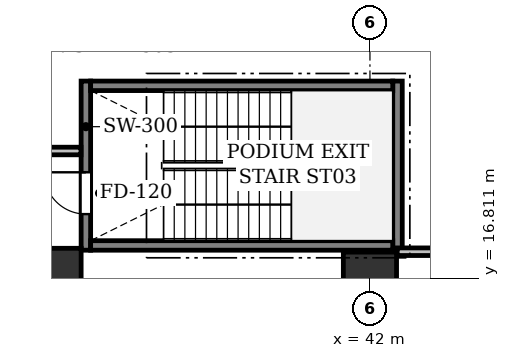
"""IFC4 building model, lengths in metres.
Left out: names, types, materials, properties, quantities, classifications, styles, units other than length and angle.
Written with IfcOpenShell. Run it as: python <this file> out.ifc"""

import sys

from ifc_helpers import new_model, si_unit, direction, frame, frame_2d, origin, origin_2d, place, context, subcontext, project, spatial, rectangle, extrude, element, fill, save


model = new_model("IFC4")
c1 = context("Model", 3, precision=1e-05, world=origin(), true_north=direction((0.0, 1.0)))
c2 = subcontext(c1, "Body", "Model", "MODEL_VIEW")
j1 = project(units=[si_unit("LENGTHUNIT", "METRE"), si_unit("PLANEANGLEUNIT", "RADIAN")], contexts=[c1])
p1 = place(None, origin())
s1 = spatial("IfcSite", under=j1, at=p1, CompositionType="ELEMENT")
p2 = place(p1, origin())
s2 = spatial("IfcBuilding", under=s1, at=p2, CompositionType="ELEMENT")
p3 = place(p2, frame((0.0, 0.0, 15.0)))
s3 = spatial("IfcBuildingStorey", under=s2, at=p3, CompositionType="ELEMENT", Elevation=15.0)
p4 = place(p3, frame((33.6, 16.8, 0.0), z_axis=(0.0, 0.0, 1.0), x_axis=(1.0, 0.0, 0.0)))
e1 = element("IfcColumn", 1, at=p4, inside=s3, PredefinedType="COLUMN", context=c2, shape_type="SweptSolid", body=[
    extrude(rectangle(XDim=1.6, YDim=1.6, at=origin_2d()), origin(), (0.0, 0.0, 1.0), 4.8),
])
p5 = place(p3, frame((42.0, 16.8, 0.0), z_axis=(0.0, 0.0, 1.0), x_axis=(1.0, 0.0, 0.0)))
e2 = element("IfcColumn", 2, at=p5, inside=s3, PredefinedType="COLUMN", context=c2, shape_type="SweptSolid", body=[
    extrude(rectangle(XDim=1.4, YDim=1.4, at=origin_2d()), origin(), (0.0, 0.0, 1.0), 4.8),
])
p6 = place(p3, frame((34.525, 17.55, 0.0), z_axis=(0.0, 0.0, 1.0), x_axis=(0.0, 1.0, 0.0)))
e3 = element("IfcWall", 3, at=p6, inside=s3, PredefinedType="SHEAR", context=c2, shape_type="SweptSolid", body=[
    extrude(rectangle(XDim=4.45, YDim=0.25, at=frame_2d((2.225, 0.0))), origin(), (0.0, 0.0, 1.0), 4.45),
])
p7 = place(p6, frame((0.95, 0.0, 0.0)))
e4 = element("IfcOpeningElement", 4, at=p7, cuts=e3, PredefinedType="OPENING", context=c2, shape_type="SweptSolid", body=[
    extrude(rectangle(XDim=1.1, YDim=2.15, at=frame_2d((0.55, 1.075))), frame((0.0, 0.135, 0.0), z_axis=(0.0, -1.0, 0.0), x_axis=(1.0, 0.0, 0.0)), (0.0, 0.0, 1.0), 0.27),
])
p8 = place(p3, frame((42.725, 17.55, 0.0), z_axis=(0.0, 0.0, 1.0), x_axis=(0.0, 1.0, 0.0)))
e5 = element("IfcWall", 5, at=p8, inside=s3, PredefinedType="SHEAR", context=c2, shape_type="SweptSolid", body=[
    extrude(rectangle(XDim=4.45, YDim=0.25, at=frame_2d((2.225, 0.0))), origin(), (0.0, 0.0, 1.0), 4.45),
])
for number, where, z_axis, x_axis in (
    (6, (34.65, 17.675, 0.0), (0.0, 0.0, 1.0), (1.0, 0.0, 0.0)),
    (7, (34.65, 21.875, 0.0), (0.0, 0.0, 1.0), (1.0, 0.0, 0.0)),
):
    element("IfcWall", number, at=place(p3, frame(where, z_axis=z_axis, x_axis=x_axis)), inside=s3, PredefinedType="SHEAR", context=c2, shape_type="SweptSolid", body=[
        extrude(rectangle(XDim=7.95, YDim=0.25, at=frame_2d((3.975, 0.0))), origin(), (0.0, 0.0, 1.0), 4.45),
    ])
p9 = place(p3, frame((29.42, 20.16, 0.0), z_axis=(0.0, 0.0, 1.0), x_axis=(1.0, 0.0, 0.0)))
e8 = element("IfcWall", 8, at=p9, inside=s3, PredefinedType="PARTITIONING", context=c2, shape_type="SweptSolid", body=[
    extrude(rectangle(XDim=4.976, YDim=0.2, at=frame_2d((2.488, 0.0))), origin(), (0.0, 0.0, 1.0), 3.25),
])
p10 = place(p3, frame((42.717, 17.51, 0.0), z_axis=(0.0, 0.0, 1.0), x_axis=(1.0, 0.0, 0.0)))
e9 = element("IfcWall", 9, at=p10, inside=s3, PredefinedType="PARTITIONING", context=c2, shape_type="SweptSolid", body=[
    extrude(rectangle(XDim=2.683, YDim=0.2, at=frame_2d((1.341, 0.0))), origin(), (0.0, 0.0, 1.0), 4.45),
])
p11 = place(p7, origin())
e10 = element("IfcDoor", 10, at=p11, inside=s3, OperationType="SINGLE_SWING_RIGHT", PredefinedType="DOOR", context=c2, shape_type="SweptSolid", body=[
    extrude(rectangle(XDim=1.1, YDim=2.15, at=frame_2d((0.55, 1.075))), frame((0.0, 0.025, 0.0), z_axis=(0.0, -1.0, 0.0), x_axis=(1.0, 0.0, 0.0)), (0.0, 0.0, 1.0), 0.05),
])
fill(e4, e10)
save(model, sys.argv[1])
